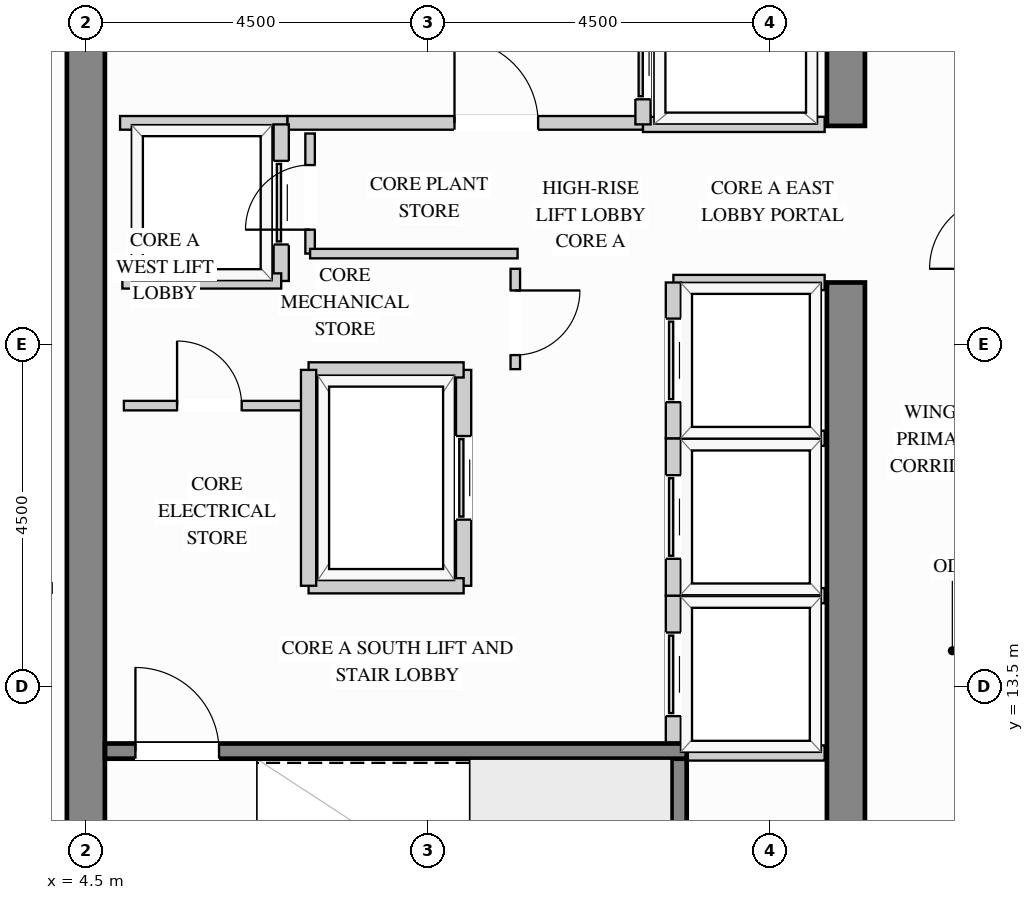
"""IFC4 building model, lengths in metres.
Left out: names, types, materials, properties, quantities, classifications, styles, units other than length and angle.
Written with IfcOpenShell. Run it as: python <this file> out.ifc"""

import sys

from ifc_helpers import new_model, si_unit, direction, frame, frame_2d, origin, place, context, subcontext, project, spatial, rectangle, extrude, source, transform, mapped, element, fill, save


model = new_model("IFC4")
c1 = context("Model", 3, precision=1e-05, world=origin(), true_north=direction((0.0, 1.0)))
c2 = subcontext(c1, "Body", "Model", "MODEL_VIEW")
j1 = project(units=[si_unit("LENGTHUNIT", "METRE"), si_unit("PLANEANGLEUNIT", "RADIAN")], contexts=[c1])
p1 = place(None, origin())
s1 = spatial("IfcSite", under=j1, at=p1, CompositionType="ELEMENT")
p2 = place(p1, origin())
s2 = spatial("IfcBuilding", under=s1, at=p2, CompositionType="ELEMENT")
p3 = place(p2, frame((0.0, 0.0, 241.2)))
s3 = spatial("IfcBuildingStorey", under=s2, at=p3, CompositionType="ELEMENT", Elevation=241.2)
m1 = source(origin(), c2, "Body", "SweptSolid", [
    extrude(rectangle(XDim=10.07, YDim=0.5, at=frame_2d((5.035, 0.0))), origin(), (0.0, 0.0, 1.0), 3.4),
])
p4 = place(p3, frame((14.5, 8.75, 0.0), z_axis=(0.0, 0.0, 1.0), x_axis=(0.0, 1.0, 0.0)))
e1 = element("IfcWall", 1, at=p4, inside=s3, PredefinedType="SHEAR", context=c2, shape_type="MappedRepresentation", body=[
    mapped(m1, transform((0.0, 0.0, 0.0), x_axis=(1.0, 0.0, 0.0), y_axis=(0.0, 1.0, 0.0), z_axis=(0.0, 0.0, 1.0))),
])
m2 = source(origin(), c2, "Body", "SweptSolid", [
    extrude(rectangle(XDim=8.37, YDim=0.5, at=frame_2d((4.185, 0.0))), origin(), (0.0, 0.0, 1.0), 3.4),
])
p5 = place(p3, frame((14.5, 20.88, 0.0), z_axis=(0.0, 0.0, 1.0), x_axis=(0.0, 1.0, 0.0)))
e2 = element("IfcWall", 2, at=p5, inside=s3, PredefinedType="SHEAR", context=c2, shape_type="MappedRepresentation", body=[
    mapped(m2, transform((0.0, 0.0, 0.0), x_axis=(1.0, 0.0, 0.0), y_axis=(0.0, 1.0, 0.0), z_axis=(0.0, 0.0, 1.0))),
])
m3 = source(origin(), c2, "Body", "SweptSolid", [
    extrude(rectangle(XDim=20.5, YDim=0.5, at=frame_2d((10.25, 0.0))), origin(), (0.0, 0.0, 1.0), 3.4),
])
p6 = place(p3, frame((4.5, 8.75, 0.0), z_axis=(0.0, 0.0, 1.0), x_axis=(0.0, 1.0, 0.0)))
e3 = element("IfcWall", 3, at=p6, inside=s3, PredefinedType="SHEAR", context=c2, shape_type="MappedRepresentation", body=[
    mapped(m3, transform((0.0, 0.0, 0.0), x_axis=(1.0, 0.0, 0.0), y_axis=(0.0, 1.0, 0.0), z_axis=(0.0, 0.0, 1.0))),
])
p7 = place(p3, frame((7.15, 20.92, 0.0), z_axis=(0.0, 0.0, 1.0), x_axis=(1.0, 0.0, 0.0)))
e4 = element("IfcWall", 4, at=p7, inside=s3, PredefinedType="PARTITIONING", context=c2, shape_type="SweptSolid", body=[
    extrude(rectangle(XDim=4.68, YDim=0.18, at=frame_2d((2.34, 0.0))), origin(), (0.0, 0.0, 1.0), 3.385),
])
p8 = place(p7, frame((2.2, 0.0, 0.0)))
e5 = element("IfcOpeningElement", 5, at=p8, cuts=e4, PredefinedType="OPENING", context=c2, shape_type="SweptSolid", body=[
    extrude(rectangle(XDim=1.1, YDim=2.15, at=frame_2d((0.55, 1.075))), frame((0.0, 0.1, 0.0), z_axis=(0.0, -1.0, 0.0), x_axis=(1.0, 0.0, 0.0)), (0.0, 0.0, 1.0), 0.2),
])
m4 = source(origin(), c2, "Body", "SweptSolid", [
    extrude(rectangle(XDim=2.2, YDim=0.18, at=frame_2d((1.1, 0.0))), origin(), (0.0, 0.0, 1.0), 3.385),
])
p9 = place(p3, frame((4.95, 20.92, 0.0), z_axis=(0.0, 0.0, 1.0), x_axis=(1.0, 0.0, 0.0)))
e6 = element("IfcWall", 6, at=p9, inside=s3, PredefinedType="PARTITIONING", context=c2, shape_type="MappedRepresentation", body=[
    mapped(m4, transform((0.0, 0.0, 0.0), x_axis=(1.0, 0.0, 0.0), y_axis=(0.0, 1.0, 0.0), z_axis=(0.0, 0.0, 1.0))),
])
p10 = place(p3, frame((10.15, 17.68, 0.0), z_axis=(0.0, 0.0, 1.0), x_axis=(0.0, 1.0, 0.0)))
e7 = element("IfcWall", 7, at=p10, inside=s3, PredefinedType="PARTITIONING", context=c2, shape_type="SweptSolid", body=[
    extrude(rectangle(XDim=1.32, YDim=0.125, at=frame_2d((0.66, 0.0))), origin(), (0.0, 0.0, 1.0), 3.385),
])
p11 = place(p10, frame((0.185, 0.0, 0.0)))
e8 = element("IfcOpeningElement", 8, at=p11, cuts=e7, PredefinedType="OPENING", context=c2, shape_type="SweptSolid", body=[
    extrude(rectangle(XDim=0.85, YDim=2.1, at=frame_2d((0.425, 1.05))), frame((0.0, 0.073, 0.0), z_axis=(0.0, -1.0, 0.0), x_axis=(1.0, 0.0, 0.0)), (0.0, 0.0, 1.0), 0.145),
])
p12 = place(p3, frame((7.45, 19.2, 0.0), z_axis=(0.0, 0.0, 1.0), x_axis=(0.0, 1.0, 0.0)))
e9 = element("IfcWall", 9, at=p12, inside=s3, PredefinedType="PARTITIONING", context=c2, shape_type="SweptSolid", body=[
    extrude(rectangle(XDim=1.58, YDim=0.125, at=frame_2d((0.79, 0.0))), origin(), (0.0, 0.0, 1.0), 3.385),
])
p13 = place(p12, frame((0.315, 0.0, 0.0)))
e10 = element("IfcOpeningElement", 10, at=p13, cuts=e9, PredefinedType="OPENING", context=c2, shape_type="SweptSolid", body=[
    extrude(rectangle(XDim=0.85, YDim=2.1, at=frame_2d((0.425, 1.05))), frame((0.0, 0.073, 0.0), z_axis=(0.0, -1.0, 0.0), x_axis=(1.0, 0.0, 0.0)), (0.0, 0.0, 1.0), 0.145),
])
m5 = source(origin(), c2, "Body", "SweptSolid", [
    extrude(rectangle(XDim=2.73, YDim=0.125, at=frame_2d((1.365, 0.0))), origin(), (0.0, 0.0, 1.0), 3.385),
])
p14 = place(p3, frame((7.45, 19.2, 0.0), z_axis=(0.0, 0.0, 1.0), x_axis=(1.0, 0.0, 0.0)))
e11 = element("IfcWall", 11, at=p14, inside=s3, PredefinedType="PARTITIONING", context=c2, shape_type="MappedRepresentation", body=[
    mapped(m5, transform((0.0, 0.0, 0.0), x_axis=(1.0, 0.0, 0.0), y_axis=(0.0, 1.0, 0.0), z_axis=(0.0, 0.0, 1.0))),
])
p15 = place(p3, frame((5.0, 17.2, 0.0), z_axis=(0.0, 0.0, 1.0), x_axis=(1.0, 0.0, 0.0)))
e12 = element("IfcWall", 12, at=p15, inside=s3, PredefinedType="PARTITIONING", context=c2, shape_type="SweptSolid", body=[
    extrude(rectangle(XDim=2.4, YDim=0.125, at=frame_2d((1.2, 0.0))), origin(), (0.0, 0.0, 1.0), 3.385),
])
p16 = place(p15, frame((0.7, 0.0, 0.0)))
e13 = element("IfcOpeningElement", 13, at=p16, cuts=e12, PredefinedType="OPENING", context=c2, shape_type="SweptSolid", body=[
    extrude(rectangle(XDim=0.85, YDim=2.1, at=frame_2d((0.425, 1.05))), frame((0.0, 0.073, 0.0), z_axis=(0.0, -1.0, 0.0), x_axis=(1.0, 0.0, 0.0)), (0.0, 0.0, 1.0), 0.145),
])
m6 = source(origin(), c2, "Body", "SweptSolid", [
    extrude(rectangle(XDim=3.698, YDim=0.125, at=frame_2d((1.849, 0.0))), origin(), (0.0, 0.0, 1.0), 3.385),
])
p17 = place(p3, frame((0.352, 14.8, 0.0), z_axis=(0.0, 0.0, 1.0), x_axis=(1.0, 0.0, 0.0)))
e14 = element("IfcWall", 14, at=p17, inside=s3, PredefinedType="PARTITIONING", context=c2, shape_type="MappedRepresentation", body=[
    mapped(m6, transform((0.0, 0.0, 0.0), x_axis=(1.0, 0.0, 0.0), y_axis=(0.0, 1.0, 0.0), z_axis=(0.0, 0.0, 1.0))),
])
m7 = source(origin(), c2, "Body", "SweptSolid", [
    extrude(rectangle(XDim=2.39, YDim=0.2, at=frame_2d((1.195, 0.0))), origin(), (0.0, 0.0, 1.0), 3.385),
])
p18 = place(p3, frame((11.83, 20.9, 0.0), z_axis=(0.0, 0.0, 1.0), x_axis=(1.0, 0.0, 0.0)))
e15 = element("IfcWall", 15, at=p18, inside=s3, PredefinedType="PARTITIONING", context=c2, shape_type="MappedRepresentation", body=[
    mapped(m7, transform((0.0, 0.0, 0.0), x_axis=(1.0, 0.0, 0.0), y_axis=(0.0, 1.0, 0.0), z_axis=(0.0, 0.0, 1.0))),
])
p19 = place(p3, frame((11.83, 20.9, 0.0), z_axis=(0.0, 0.0, 1.0), x_axis=(0.0, 1.0, 0.0)))
e16 = element("IfcWall", 16, at=p19, inside=s3, PredefinedType="PARTITIONING", context=c2, shape_type="SweptSolid", body=[
    extrude(rectangle(XDim=1.76, YDim=0.2, at=frame_2d((0.88, 0.0))), origin(), (0.0, 0.0, 1.0), 3.385),
])
p20 = place(p19, frame((0.33, 0.0, 0.0)))
e17 = element("IfcOpeningElement", 17, at=p20, cuts=e16, PredefinedType="OPENING", context=c2, shape_type="SweptSolid", body=[
    extrude(rectangle(XDim=1.1, YDim=2.2, at=frame_2d((0.55, 1.1))), frame((0.0, 0.11, 0.0), z_axis=(0.0, -1.0, 0.0), x_axis=(1.0, 0.0, 0.0)), (0.0, 0.0, 1.0), 0.22),
])
m8 = source(origin(), c2, "Body", "SweptSolid", [
    extrude(rectangle(XDim=1.99, YDim=0.2, at=frame_2d((0.995, 0.0))), origin(), (0.0, 0.0, 1.0), 3.385),
])
for number, where, z_axis, x_axis in (
    (18, (12.23, 14.7, 0.0), (0.0, 0.0, 1.0), (1.0, 0.0, 0.0)),
    (19, (12.23, 12.63, 0.0), (0.0, 0.0, 1.0), (1.0, 0.0, 0.0)),
):
    element("IfcWall", number, at=place(p3, frame(where, z_axis=z_axis, x_axis=x_axis)), inside=s3, PredefinedType="PARTITIONING", context=c2, shape_type="MappedRepresentation", body=[
        mapped(m8, transform((0.0, 0.0, 0.0), x_axis=(1.0, 0.0, 0.0), y_axis=(0.0, 1.0, 0.0), z_axis=(0.0, 0.0, 1.0))),
    ])
p21 = place(p3, frame((12.23, 12.63, 0.0), z_axis=(0.0, 0.0, 1.0), x_axis=(0.0, 1.0, 0.0)))
e20 = element("IfcWall", 20, at=p21, inside=s3, PredefinedType="PARTITIONING", context=c2, shape_type="SweptSolid", body=[
    extrude(rectangle(XDim=2.07, YDim=0.2, at=frame_2d((1.035, 0.0))), origin(), (0.0, 0.0, 1.0), 3.385),
])
p22 = place(p21, frame((0.485, 0.0, 0.0)))
e21 = element("IfcOpeningElement", 21, at=p22, cuts=e20, PredefinedType="OPENING", context=c2, shape_type="SweptSolid", body=[
    extrude(rectangle(XDim=1.1, YDim=2.2, at=frame_2d((0.55, 1.1))), frame((0.0, 0.11, 0.0), z_axis=(0.0, -1.0, 0.0), x_axis=(1.0, 0.0, 0.0)), (0.0, 0.0, 1.0), 0.22),
])
p23 = place(p3, frame((12.23, 16.77, 0.0), z_axis=(0.0, 0.0, 1.0), x_axis=(1.0, 0.0, 0.0)))
e22 = element("IfcWall", 22, at=p23, inside=s3, PredefinedType="PARTITIONING", context=c2, shape_type="MappedRepresentation", body=[
    mapped(m8, transform((0.0, 0.0, 0.0), x_axis=(1.0, 0.0, 0.0), y_axis=(0.0, 1.0, 0.0), z_axis=(0.0, 0.0, 1.0))),
])
p24 = place(p3, frame((12.23, 14.7, 0.0), z_axis=(0.0, 0.0, 1.0), x_axis=(0.0, 1.0, 0.0)))
e23 = element("IfcWall", 23, at=p24, inside=s3, PredefinedType="PARTITIONING", context=c2, shape_type="SweptSolid", body=[
    extrude(rectangle(XDim=2.07, YDim=0.2, at=frame_2d((1.035, 0.0))), origin(), (0.0, 0.0, 1.0), 3.385),
])
p25 = place(p24, frame((0.485, 0.0, 0.0)))
e24 = element("IfcOpeningElement", 24, at=p25, cuts=e23, PredefinedType="OPENING", context=c2, shape_type="SweptSolid", body=[
    extrude(rectangle(XDim=1.1, YDim=2.2, at=frame_2d((0.55, 1.1))), frame((0.0, 0.11, 0.0), z_axis=(0.0, -1.0, 0.0), x_axis=(1.0, 0.0, 0.0)), (0.0, 0.0, 1.0), 0.22),
])
p26 = place(p3, frame((12.23, 18.82, 0.0), z_axis=(0.0, 0.0, 1.0), x_axis=(1.0, 0.0, 0.0)))
e25 = element("IfcWall", 25, at=p26, inside=s3, PredefinedType="PARTITIONING", context=c2, shape_type="MappedRepresentation", body=[
    mapped(m8, transform((0.0, 0.0, 0.0), x_axis=(1.0, 0.0, 0.0), y_axis=(0.0, 1.0, 0.0), z_axis=(0.0, 0.0, 1.0))),
])
p27 = place(p3, frame((12.23, 16.77, 0.0), z_axis=(0.0, 0.0, 1.0), x_axis=(0.0, 1.0, 0.0)))
e26 = element("IfcWall", 26, at=p27, inside=s3, PredefinedType="PARTITIONING", context=c2, shape_type="SweptSolid", body=[
    extrude(rectangle(XDim=2.05, YDim=0.2, at=frame_2d((1.025, 0.0))), origin(), (0.0, 0.0, 1.0), 3.385),
])
p28 = place(p27, frame((0.475, 0.0, 0.0)))
e27 = element("IfcOpeningElement", 27, at=p28, cuts=e26, PredefinedType="OPENING", context=c2, shape_type="SweptSolid", body=[
    extrude(rectangle(XDim=1.1, YDim=2.2, at=frame_2d((0.55, 1.1))), frame((0.0, 0.11, 0.0), z_axis=(0.0, -1.0, 0.0), x_axis=(1.0, 0.0, 0.0)), (0.0, 0.0, 1.0), 0.22),
])
p29 = place(p3, frame((7.07, 18.84, 0.0), z_axis=(0.0, 0.0, 1.0), x_axis=(0.0, 1.0, 0.0)))
e28 = element("IfcWall", 28, at=p29, inside=s3, PredefinedType="PARTITIONING", context=c2, shape_type="SweptSolid", body=[
    extrude(rectangle(XDim=2.06, YDim=0.2, at=frame_2d((1.03, 0.0))), origin(), (0.0, 0.0, 1.0), 3.385),
])
p30 = place(p29, frame((0.48, 0.0, 0.0)))
e29 = element("IfcOpeningElement", 29, at=p30, cuts=e28, PredefinedType="OPENING", context=c2, shape_type="SweptSolid", body=[
    extrude(rectangle(XDim=1.1, YDim=2.2, at=frame_2d((0.55, 1.1))), frame((0.0, 0.11, 0.0), z_axis=(0.0, -1.0, 0.0), x_axis=(1.0, 0.0, 0.0)), (0.0, 0.0, 1.0), 0.22),
])
m9 = source(origin(), c2, "Body", "SweptSolid", [
    extrude(rectangle(XDim=2.09, YDim=0.2, at=frame_2d((1.045, 0.0))), origin(), (0.0, 0.0, 1.0), 3.385),
])
p31 = place(p3, frame((4.98, 18.84, 0.0), z_axis=(0.0, 0.0, 1.0), x_axis=(1.0, 0.0, 0.0)))
e30 = element("IfcWall", 30, at=p31, inside=s3, PredefinedType="PARTITIONING", context=c2, shape_type="MappedRepresentation", body=[
    mapped(m9, transform((0.0, 0.0, 0.0), x_axis=(1.0, 0.0, 0.0), y_axis=(0.0, 1.0, 0.0), z_axis=(0.0, 0.0, 1.0))),
])
p32 = place(p3, frame((9.47, 14.83, 0.0), z_axis=(0.0, 0.0, 1.0), x_axis=(0.0, 1.0, 0.0)))
e31 = element("IfcWall", 31, at=p32, inside=s3, PredefinedType="PARTITIONING", context=c2, shape_type="SweptSolid", body=[
    extrude(rectangle(XDim=2.84, YDim=0.2, at=frame_2d((1.42, 0.0))), origin(), (0.0, 0.0, 1.0), 3.385),
])
p33 = place(p32, frame((0.87, 0.0, 0.0)))
e32 = element("IfcOpeningElement", 32, at=p33, cuts=e31, PredefinedType="OPENING", context=c2, shape_type="SweptSolid", body=[
    extrude(rectangle(XDim=1.1, YDim=2.2, at=frame_2d((0.55, 1.1))), frame((0.0, 0.11, 0.0), z_axis=(0.0, -1.0, 0.0), x_axis=(1.0, 0.0, 0.0)), (0.0, 0.0, 1.0), 0.22),
])
m10 = source(origin(), c2, "Body", "SweptSolid", [
    extrude(rectangle(XDim=2.04, YDim=0.2, at=frame_2d((1.02, 0.0))), origin(), (0.0, 0.0, 1.0), 3.385),
])
for number, where, z_axis, x_axis in (
    (33, (7.43, 17.67, 0.0), (0.0, 0.0, 1.0), (1.0, 0.0, 0.0)),
    (34, (7.43, 14.83, 0.0), (0.0, 0.0, 1.0), (1.0, 0.0, 0.0)),
):
    element("IfcWall", number, at=place(p3, frame(where, z_axis=z_axis, x_axis=x_axis)), inside=s3, PredefinedType="PARTITIONING", context=c2, shape_type="MappedRepresentation", body=[
        mapped(m10, transform((0.0, 0.0, 0.0), x_axis=(1.0, 0.0, 0.0), y_axis=(0.0, 1.0, 0.0), z_axis=(0.0, 0.0, 1.0))),
    ])
m11 = source(origin(), c2, "Body", "SweptSolid", [
    extrude(rectangle(XDim=2.84, YDim=0.2, at=frame_2d((1.42, 0.0))), origin(), (0.0, 0.0, 1.0), 3.385),
])
p34 = place(p3, frame((7.43, 14.83, 0.0), z_axis=(0.0, 0.0, 1.0), x_axis=(0.0, 1.0, 0.0)))
e35 = element("IfcWall", 35, at=p34, inside=s3, PredefinedType="PARTITIONING", context=c2, shape_type="MappedRepresentation", body=[
    mapped(m11, transform((0.0, 0.0, 0.0), x_axis=(1.0, 0.0, 0.0), y_axis=(0.0, 1.0, 0.0), z_axis=(0.0, 0.0, 1.0))),
])
m12 = source(origin(), c2, "Body", "SweptSolid", [
    extrude(rectangle(XDim=3.803, YDim=0.2, at=frame_2d((1.901, 0.0))), origin(), (0.0, 0.0, 1.0), 3.4),
])
p35 = place(p3, frame((12.305, 8.752, 0.0), z_axis=(0.0, 0.0, 1.0), x_axis=(0.0, 1.0, 0.0)))
e36 = element("IfcWall", 36, at=p35, inside=s3, PredefinedType="SHEAR", context=c2, shape_type="MappedRepresentation", body=[
    mapped(m12, transform((0.0, 0.0, 0.0), x_axis=(1.0, 0.0, 0.0), y_axis=(0.0, 1.0, 0.0), z_axis=(0.0, 0.0, 1.0))),
])
p36 = place(p3, frame((4.752, 12.655, 0.0), z_axis=(0.0, 0.0, 1.0), x_axis=(1.0, 0.0, 0.0)))
e37 = element("IfcWall", 37, at=p36, inside=s3, PredefinedType="SHEAR", context=c2, shape_type="SweptSolid", body=[
    extrude(rectangle(XDim=7.653, YDim=0.2, at=frame_2d((3.827, 0.0))), origin(), (0.0, 0.0, 1.0), 3.4),
])
p37 = place(p36, frame((0.4, 0.0, 0.0)))
e38 = element("IfcOpeningElement", 38, at=p37, cuts=e37, PredefinedType="OPENING", context=c2, shape_type="SweptSolid", body=[
    extrude(rectangle(XDim=1.1, YDim=2.15, at=frame_2d((0.55, 1.075))), frame((0.0, 0.11, 0.0), z_axis=(0.0, -1.0, 0.0), x_axis=(1.0, 0.0, 0.0)), (0.0, 0.0, 1.0), 0.22),
])
m13 = source(origin(), c2, "Body", "SweptSolid", [
    extrude(rectangle(XDim=1.1, YDim=2.15, at=frame_2d((0.55, 1.075))), frame((0.0, 0.025, 0.0), z_axis=(0.0, -1.0, 0.0), x_axis=(1.0, 0.0, 0.0)), (0.0, 0.0, 1.0), 0.05),
])
p38 = place(p8, origin())
e39 = element("IfcDoor", 39, at=p38, inside=s3, OperationType="SINGLE_SWING_LEFT", PredefinedType="DOOR", context=c2, shape_type="MappedRepresentation", body=[
    mapped(m13, transform((0.0, 0.0, 0.0), x_axis=(1.0, 0.0, 0.0), y_axis=(0.0, 1.0, 0.0), z_axis=(0.0, 0.0, 1.0))),
])
fill(e5, e39)
m14 = source(origin(), c2, "Body", "SweptSolid", [
    extrude(rectangle(XDim=1.1, YDim=2.2, at=frame_2d((0.55, 1.1))), frame((0.0, 0.025, 0.0), z_axis=(0.0, -1.0, 0.0), x_axis=(1.0, 0.0, 0.0)), (0.0, 0.0, 1.0), 0.05),
])
p39 = place(p20, origin())
e40 = element("IfcDoor", 40, at=p39, inside=s3, OperationType="SLIDING_TO_LEFT", PredefinedType="DOOR", context=c2, shape_type="MappedRepresentation", body=[
    mapped(m14, transform((0.0, 0.0, 0.0), x_axis=(1.0, 0.0, 0.0), y_axis=(0.0, 1.0, 0.0), z_axis=(0.0, 0.0, 1.0))),
])
fill(e17, e40)
p40 = place(p22, origin())
e41 = element("IfcDoor", 41, at=p40, inside=s3, OperationType="SLIDING_TO_LEFT", PredefinedType="DOOR", context=c2, shape_type="MappedRepresentation", body=[
    mapped(m14, transform((0.0, 0.0, 0.0), x_axis=(1.0, 0.0, 0.0), y_axis=(0.0, 1.0, 0.0), z_axis=(0.0, 0.0, 1.0))),
])
fill(e21, e41)
p41 = place(p25, origin())
e42 = element("IfcDoor", 42, at=p41, inside=s3, OperationType="SLIDING_TO_LEFT", PredefinedType="DOOR", context=c2, shape_type="MappedRepresentation", body=[
    mapped(m14, transform((0.0, 0.0, 0.0), x_axis=(1.0, 0.0, 0.0), y_axis=(0.0, 1.0, 0.0), z_axis=(0.0, 0.0, 1.0))),
])
fill(e24, e42)
p42 = place(p28, origin())
e43 = element("IfcDoor", 43, at=p42, inside=s3, OperationType="SLIDING_TO_LEFT", PredefinedType="DOOR", context=c2, shape_type="MappedRepresentation", body=[
    mapped(m14, transform((0.0, 0.0, 0.0), x_axis=(1.0, 0.0, 0.0), y_axis=(0.0, 1.0, 0.0), z_axis=(0.0, 0.0, 1.0))),
])
fill(e27, e43)
p43 = place(p30, origin())
e44 = element("IfcDoor", 44, at=p43, inside=s3, OperationType="SLIDING_TO_LEFT", PredefinedType="DOOR", context=c2, shape_type="MappedRepresentation", body=[
    mapped(m14, transform((0.0, 0.0, 0.0), x_axis=(1.0, 0.0, 0.0), y_axis=(0.0, 1.0, 0.0), z_axis=(0.0, 0.0, 1.0))),
])
fill(e29, e44)
p44 = place(p33, origin())
e45 = element("IfcDoor", 45, at=p44, inside=s3, OperationType="SLIDING_TO_LEFT", PredefinedType="DOOR", context=c2, shape_type="MappedRepresentation", body=[
    mapped(m14, transform((0.0, 0.0, 0.0), x_axis=(1.0, 0.0, 0.0), y_axis=(0.0, 1.0, 0.0), z_axis=(0.0, 0.0, 1.0))),
])
fill(e32, e45)
m15 = source(origin(), c2, "Body", "SweptSolid", [
    extrude(rectangle(XDim=0.85, YDim=2.1, at=frame_2d((0.425, 1.05))), frame((0.0, 0.025, 0.0), z_axis=(0.0, -1.0, 0.0), x_axis=(1.0, 0.0, 0.0)), (0.0, 0.0, 1.0), 0.05),
])
p45 = place(p11, origin())
e46 = element("IfcDoor", 46, at=p45, inside=s3, OperationType="SINGLE_SWING_RIGHT", PredefinedType="DOOR", context=c2, shape_type="MappedRepresentation", body=[
    mapped(m15, transform((0.0, 0.0, 0.0), x_axis=(1.0, 0.0, 0.0), y_axis=(0.0, 1.0, 0.0), z_axis=(0.0, 0.0, 1.0))),
])
fill(e8, e46)
p46 = place(p16, origin())
e47 = element("IfcDoor", 47, at=p46, inside=s3, OperationType="SINGLE_SWING_LEFT", PredefinedType="DOOR", context=c2, shape_type="MappedRepresentation", body=[
    mapped(m15, transform((0.0, 0.0, 0.0), x_axis=(1.0, 0.0, 0.0), y_axis=(0.0, 1.0, 0.0), z_axis=(0.0, 0.0, 1.0))),
])
fill(e13, e47)
p47 = place(p13, origin())
e48 = element("IfcDoor", 48, at=p47, inside=s3, OperationType="SINGLE_SWING_LEFT", PredefinedType="DOOR", context=c2, shape_type="MappedRepresentation", body=[
    mapped(m15, transform((0.0, 0.0, 0.0), x_axis=(1.0, 0.0, 0.0), y_axis=(0.0, 1.0, 0.0), z_axis=(0.0, 0.0, 1.0))),
])
fill(e10, e48)
m16 = source(origin(), c2, "Body", "SweptSolid", [
    extrude(rectangle(XDim=1.1, YDim=2.15, at=frame_2d((0.55, 1.075))), frame((0.0, 0.025, 0.0), z_axis=(0.0, -1.0, 0.0), x_axis=(1.0, 0.0, 0.0)), (0.0, 0.0, 1.0), 0.05),
])
p48 = place(p37, origin())
e49 = element("IfcDoor", 49, at=p48, inside=s3, OperationType="SINGLE_SWING_LEFT", PredefinedType="DOOR", context=c2, shape_type="MappedRepresentation", body=[
    mapped(m16, transform((0.0, 0.0, 0.0), x_axis=(1.0, 0.0, 0.0), y_axis=(0.0, 1.0, 0.0), z_axis=(0.0, 0.0, 1.0))),
])
fill(e38, e49)
save(model, sys.argv[1])
